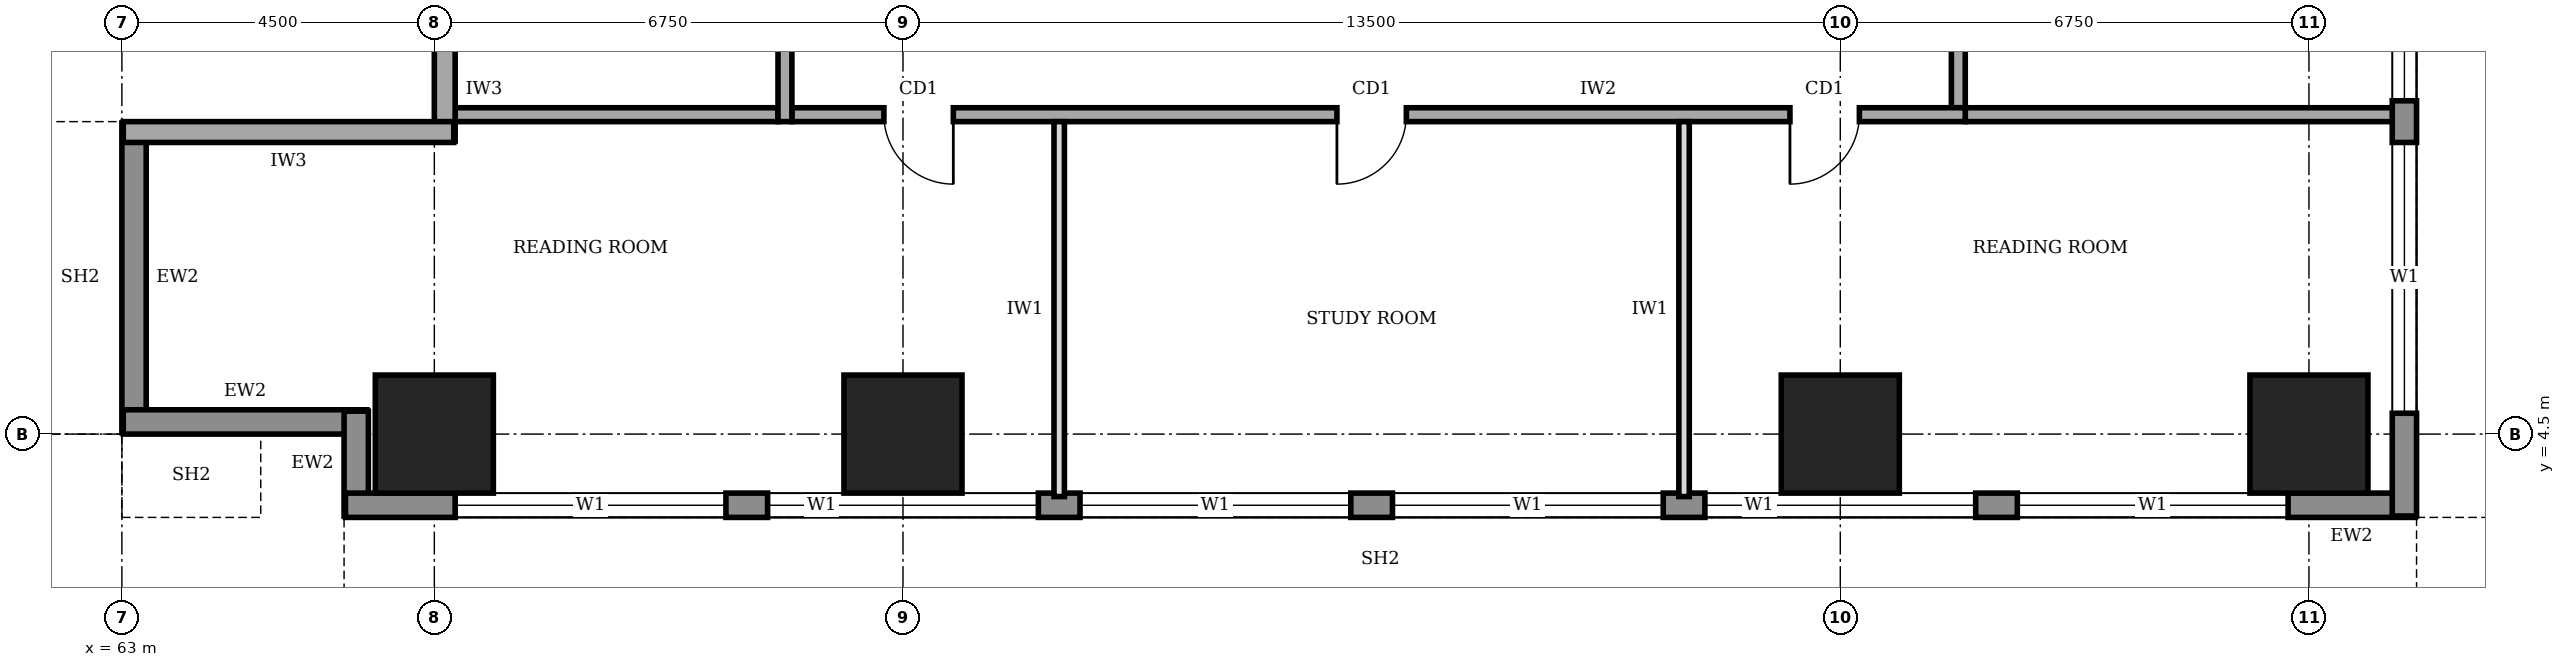
"""IFC4 building model, lengths in metres.
Left out: names, types, materials, properties, quantities, classifications, styles, units other than length and angle.
Written with IfcOpenShell. Run it as: python <this file> out.ifc"""

import sys

from ifc_helpers import new_model, si_unit, direction, frame, frame_2d, origin, origin_2d, place, context, subcontext, project, spatial, rectangle, extrude, element, fill, save


model = new_model("IFC4")
c1 = context("Model", 3, precision=1e-05, world=origin(), true_north=direction((0.0, 1.0)))
c2 = subcontext(c1, "Body", "Model", "MODEL_VIEW")
j1 = project(units=[si_unit("LENGTHUNIT", "METRE"), si_unit("PLANEANGLEUNIT", "RADIAN")], contexts=[c1])
p1 = place(None, origin())
s1 = spatial("IfcSite", under=j1, at=p1, CompositionType="ELEMENT")
p2 = place(p1, origin())
s2 = spatial("IfcBuilding", under=s1, at=p2, CompositionType="ELEMENT")
p3 = place(p2, frame((0.0, 0.0, 109.0)))
s3 = spatial("IfcBuildingStorey", under=s2, at=p3, CompositionType="ELEMENT", Elevation=109.0)
for number, where, z_axis, x_axis in (
    (1, (67.5, 4.5, 0.0), (0.0, 0.0, 1.0), (1.0, 0.0, 0.0)),
    (2, (74.25, 4.5, 0.0), (0.0, 0.0, 1.0), (1.0, 0.0, 0.0)),
    (3, (87.75, 4.5, 0.0), (0.0, 0.0, 1.0), (1.0, 0.0, 0.0)),
    (4, (94.5, 4.5, 0.0), (0.0, 0.0, 1.0), (1.0, 0.0, 0.0)),
):
    element("IfcColumn", number, at=place(p3, frame(where, z_axis=z_axis, x_axis=x_axis)), inside=s3, PredefinedType="COLUMN", context=c2, shape_type="SweptSolid", body=[
        extrude(rectangle(XDim=1.7, YDim=1.7, at=origin_2d()), origin(), (0.0, 0.0, 1.0), 4.0),
    ])
p4 = place(p3, frame((63.175, 8.98, 0.0), z_axis=(0.0, 0.0, 1.0), x_axis=(0.0, -1.0, 0.0)))
e5 = element("IfcWall", 5, at=p4, inside=s3, PredefinedType="STANDARD", context=c2, shape_type="SweptSolid", body=[
    extrude(rectangle(XDim=4.46, YDim=0.35, at=frame_2d((2.23, 0.0))), origin(), (0.0, 0.0, 1.0), 3.75),
])
p5 = place(p3, frame((63.02, 4.675, 0.0), z_axis=(0.0, 0.0, 1.0), x_axis=(1.0, 0.0, 0.0)))
e6 = element("IfcWall", 6, at=p5, inside=s3, PredefinedType="STANDARD", context=c2, shape_type="SweptSolid", body=[
    extrude(rectangle(XDim=3.51, YDim=0.35, at=frame_2d((1.755, 0.0))), origin(), (0.0, 0.0, 1.0), 2.85),
])
p6 = place(p3, frame((66.375, 4.83, 0.0), z_axis=(0.0, 0.0, 1.0), x_axis=(0.0, -1.0, 0.0)))
e7 = element("IfcWall", 7, at=p6, inside=s3, PredefinedType="STANDARD", context=c2, shape_type="SweptSolid", body=[
    extrude(rectangle(XDim=1.51, YDim=0.35, at=frame_2d((0.755, 0.0))), origin(), (0.0, 0.0, 1.0), 3.75),
])
p7 = place(p3, frame((66.22, 3.475, 0.0), z_axis=(0.0, 0.0, 1.0), x_axis=(1.0, 0.0, 0.0)))
e8 = element("IfcWall", 8, at=p7, inside=s3, PredefinedType="STANDARD", context=c2, shape_type="SweptSolid", body=[
    extrude(rectangle(XDim=29.81, YDim=0.35, at=frame_2d((14.905, 0.0))), origin(), (0.0, 0.0, 1.0), 3.75),
])
p8 = place(p7, frame((1.58, 0.0, 0.9)))
e9 = element("IfcOpeningElement", 9, at=p8, cuts=e8, PredefinedType="OPENING", context=c2, shape_type="SweptSolid", body=[
    extrude(rectangle(XDim=3.9, YDim=2.2, at=frame_2d((1.95, 1.1))), frame((0.0, 0.185, 0.0), z_axis=(0.0, -1.0, 0.0), x_axis=(1.0, 0.0, 0.0)), (0.0, 0.0, 1.0), 0.37),
])
p9 = place(p7, frame((6.08, 0.0, 0.9)))
e10 = element("IfcOpeningElement", 10, at=p9, cuts=e8, PredefinedType="OPENING", context=c2, shape_type="SweptSolid", body=[
    extrude(rectangle(XDim=3.9, YDim=2.2, at=frame_2d((1.95, 1.1))), frame((0.0, 0.185, 0.0), z_axis=(0.0, -1.0, 0.0), x_axis=(1.0, 0.0, 0.0)), (0.0, 0.0, 1.0), 0.37),
])
p10 = place(p7, frame((10.58, 0.0, 0.9)))
e11 = element("IfcOpeningElement", 11, at=p10, cuts=e8, PredefinedType="OPENING", context=c2, shape_type="SweptSolid", body=[
    extrude(rectangle(XDim=3.9, YDim=2.2, at=frame_2d((1.95, 1.1))), frame((0.0, 0.185, 0.0), z_axis=(0.0, -1.0, 0.0), x_axis=(1.0, 0.0, 0.0)), (0.0, 0.0, 1.0), 0.37),
])
p11 = place(p7, frame((15.08, 0.0, 0.9)))
e12 = element("IfcOpeningElement", 12, at=p11, cuts=e8, PredefinedType="OPENING", context=c2, shape_type="SweptSolid", body=[
    extrude(rectangle(XDim=3.9, YDim=2.2, at=frame_2d((1.95, 1.1))), frame((0.0, 0.185, 0.0), z_axis=(0.0, -1.0, 0.0), x_axis=(1.0, 0.0, 0.0)), (0.0, 0.0, 1.0), 0.37),
])
p12 = place(p7, frame((19.58, 0.0, 0.9)))
e13 = element("IfcOpeningElement", 13, at=p12, cuts=e8, PredefinedType="OPENING", context=c2, shape_type="SweptSolid", body=[
    extrude(rectangle(XDim=3.9, YDim=2.2, at=frame_2d((1.95, 1.1))), frame((0.0, 0.185, 0.0), z_axis=(0.0, -1.0, 0.0), x_axis=(1.0, 0.0, 0.0)), (0.0, 0.0, 1.0), 0.37),
])
p13 = place(p7, frame((24.08, 0.0, 0.9)))
e14 = element("IfcOpeningElement", 14, at=p13, cuts=e8, PredefinedType="OPENING", context=c2, shape_type="SweptSolid", body=[
    extrude(rectangle(XDim=3.9, YDim=2.2, at=frame_2d((1.95, 1.1))), frame((0.0, 0.185, 0.0), z_axis=(0.0, -1.0, 0.0), x_axis=(1.0, 0.0, 0.0)), (0.0, 0.0, 1.0), 0.37),
])
p14 = place(p3, frame((95.875, 3.32, 0.0), z_axis=(0.0, 0.0, 1.0), x_axis=(0.0, 1.0, 0.0)))
e15 = element("IfcWall", 15, at=p14, inside=s3, PredefinedType="STANDARD", context=c2, shape_type="SweptSolid", body=[
    extrude(rectangle(XDim=33.96, YDim=0.35, at=frame_2d((16.98, 0.0))), origin(), (0.0, 0.0, 1.0), 3.75),
])
p15 = place(p14, frame((1.48, 0.0, 0.9)))
e16 = element("IfcOpeningElement", 16, at=p15, cuts=e15, PredefinedType="OPENING", context=c2, shape_type="SweptSolid", body=[
    extrude(rectangle(XDim=3.9, YDim=2.2, at=frame_2d((1.95, 1.1))), frame((0.0, 0.185, 0.0), z_axis=(0.0, -1.0, 0.0), x_axis=(1.0, 0.0, 0.0)), (0.0, 0.0, 1.0), 0.37),
])
p16 = place(p14, frame((5.98, 0.0, 0.9)))
e17 = element("IfcOpeningElement", 17, at=p16, cuts=e15, PredefinedType="OPENING", context=c2, shape_type="SweptSolid", body=[
    extrude(rectangle(XDim=3.9, YDim=2.2, at=frame_2d((1.95, 1.1))), frame((0.0, 0.185, 0.0), z_axis=(0.0, -1.0, 0.0), x_axis=(1.0, 0.0, 0.0)), (0.0, 0.0, 1.0), 0.37),
])
p17 = place(p14, frame((10.48, 0.0, 0.9)))
e18 = element("IfcOpeningElement", 18, at=p17, cuts=e15, PredefinedType="OPENING", context=c2, shape_type="SweptSolid", body=[
    extrude(rectangle(XDim=3.9, YDim=2.2, at=frame_2d((1.95, 1.1))), frame((0.0, 0.185, 0.0), z_axis=(0.0, -1.0, 0.0), x_axis=(1.0, 0.0, 0.0)), (0.0, 0.0, 1.0), 0.37),
])
p18 = place(p14, frame((14.98, 0.0, 0.9)))
e19 = element("IfcOpeningElement", 19, at=p18, cuts=e15, PredefinedType="OPENING", context=c2, shape_type="SweptSolid", body=[
    extrude(rectangle(XDim=3.9, YDim=2.2, at=frame_2d((1.95, 1.1))), frame((0.0, 0.185, 0.0), z_axis=(0.0, -1.0, 0.0), x_axis=(1.0, 0.0, 0.0)), (0.0, 0.0, 1.0), 0.37),
])
p19 = place(p14, frame((19.48, 0.0, 0.9)))
e20 = element("IfcOpeningElement", 20, at=p19, cuts=e15, PredefinedType="OPENING", context=c2, shape_type="SweptSolid", body=[
    extrude(rectangle(XDim=3.9, YDim=2.2, at=frame_2d((1.95, 1.1))), frame((0.0, 0.185, 0.0), z_axis=(0.0, -1.0, 0.0), x_axis=(1.0, 0.0, 0.0)), (0.0, 0.0, 1.0), 0.37),
])
p20 = place(p14, frame((23.98, 0.0, 0.9)))
e21 = element("IfcOpeningElement", 21, at=p20, cuts=e15, PredefinedType="OPENING", context=c2, shape_type="SweptSolid", body=[
    extrude(rectangle(XDim=3.9, YDim=2.2, at=frame_2d((1.95, 1.1))), frame((0.0, 0.185, 0.0), z_axis=(0.0, -1.0, 0.0), x_axis=(1.0, 0.0, 0.0)), (0.0, 0.0, 1.0), 0.37),
])
p21 = place(p14, frame((28.48, 0.0, 0.9)))
e22 = element("IfcOpeningElement", 22, at=p21, cuts=e15, PredefinedType="OPENING", context=c2, shape_type="SweptSolid", body=[
    extrude(rectangle(XDim=3.9, YDim=2.2, at=frame_2d((1.95, 1.1))), frame((0.0, 0.185, 0.0), z_axis=(0.0, -1.0, 0.0), x_axis=(1.0, 0.0, 0.0)), (0.0, 0.0, 1.0), 0.37),
])
p22 = place(p3, frame((67.65, 10.2, 0.0), z_axis=(0.0, 0.0, 1.0), x_axis=(0.0, -1.0, 0.0)))
e23 = element("IfcWall", 23, at=p22, inside=s3, PredefinedType="SOLIDWALL", context=c2, shape_type="SweptSolid", body=[
    extrude(rectangle(XDim=1.48, YDim=0.3, at=frame_2d((0.74, 0.0))), origin(), (0.0, 0.0, 1.0), 2.65),
])
p23 = place(p3, frame((67.78, 8.85, 0.0), z_axis=(0.0, 0.0, 1.0), x_axis=(-1.0, 0.0, 0.0)))
e24 = element("IfcWall", 24, at=p23, inside=s3, PredefinedType="SOLIDWALL", context=c2, shape_type="SweptSolid", body=[
    extrude(rectangle(XDim=4.76, YDim=0.3, at=frame_2d((2.38, 0.0))), origin(), (0.0, 0.0, 1.0), 3.75),
])
p24 = place(p3, frame((72.65, 9.1, 0.0), z_axis=(0.0, 0.0, 1.0), x_axis=(1.0, 0.0, 0.0)))
e25 = element("IfcWall", 25, at=p24, inside=s3, PredefinedType="SOLIDWALL", context=c2, shape_type="SweptSolid", body=[
    extrude(rectangle(XDim=16.9, YDim=0.2, at=frame_2d((8.45, 0.0))), origin(), (0.0, 0.0, 1.0), 3.75),
])
p25 = place(p24, frame((1.325, 0.0, 0.0)))
e26 = element("IfcOpeningElement", 26, at=p25, cuts=e25, PredefinedType="OPENING", context=c2, shape_type="SweptSolid", body=[
    extrude(rectangle(XDim=1.0, YDim=2.1, at=frame_2d((0.5, 1.05))), frame((0.0, 0.11, 0.0), z_axis=(0.0, -1.0, 0.0), x_axis=(1.0, 0.0, 0.0)), (0.0, 0.0, 1.0), 0.22),
])
p26 = place(p24, frame((7.85, 0.0, 0.0)))
e27 = element("IfcOpeningElement", 27, at=p26, cuts=e25, PredefinedType="OPENING", context=c2, shape_type="SweptSolid", body=[
    extrude(rectangle(XDim=1.0, YDim=2.1, at=frame_2d((0.5, 1.05))), frame((0.0, 0.11, 0.0), z_axis=(0.0, -1.0, 0.0), x_axis=(1.0, 0.0, 0.0)), (0.0, 0.0, 1.0), 0.22),
])
p27 = place(p24, frame((14.375, 0.0, 0.0)))
e28 = element("IfcOpeningElement", 28, at=p27, cuts=e25, PredefinedType="OPENING", context=c2, shape_type="SweptSolid", body=[
    extrude(rectangle(XDim=1.0, YDim=2.1, at=frame_2d((0.5, 1.05))), frame((0.0, 0.11, 0.0), z_axis=(0.0, -1.0, 0.0), x_axis=(1.0, 0.0, 0.0)), (0.0, 0.0, 1.0), 0.22),
])
p28 = place(p3, frame((89.45, 9.2, 0.0), z_axis=(0.0, 0.0, 1.0), x_axis=(0.0, 1.0, 0.0)))
e29 = element("IfcWall", 29, at=p28, inside=s3, PredefinedType="SOLIDWALL", context=c2, shape_type="SweptSolid", body=[
    extrude(rectangle(XDim=23.8, YDim=0.2, at=frame_2d((11.9, 0.0))), origin(), (0.0, 0.0, 1.0), 3.75),
])
p29 = place(p28, frame((1.625, 0.0, 0.0)))
e30 = element("IfcOpeningElement", 30, at=p29, cuts=e29, PredefinedType="OPENING", context=c2, shape_type="SweptSolid", body=[
    extrude(rectangle(XDim=1.0, YDim=2.1, at=frame_2d((0.5, 1.05))), frame((0.0, 0.11, 0.0), z_axis=(0.0, -1.0, 0.0), x_axis=(1.0, 0.0, 0.0)), (0.0, 0.0, 1.0), 0.22),
])
p30 = place(p28, frame((5.625, 0.0, 0.0)))
e31 = element("IfcOpeningElement", 31, at=p30, cuts=e29, PredefinedType="OPENING", context=c2, shape_type="SweptSolid", body=[
    extrude(rectangle(XDim=0.9, YDim=2.1, at=frame_2d((0.45, 1.05))), frame((0.0, 0.11, 0.0), z_axis=(0.0, -1.0, 0.0), x_axis=(1.0, 0.0, 0.0)), (0.0, 0.0, 1.0), 0.22),
])
p31 = place(p28, frame((10.35, 0.0, 0.0)))
e32 = element("IfcOpeningElement", 32, at=p31, cuts=e29, PredefinedType="OPENING", context=c2, shape_type="SweptSolid", body=[
    extrude(rectangle(XDim=0.9, YDim=2.1, at=frame_2d((0.45, 1.05))), frame((0.0, 0.11, 0.0), z_axis=(0.0, -1.0, 0.0), x_axis=(1.0, 0.0, 0.0)), (0.0, 0.0, 1.0), 0.22),
])
p32 = place(p28, frame((13.325, 0.0, 0.0)))
e33 = element("IfcOpeningElement", 33, at=p32, cuts=e29, PredefinedType="OPENING", context=c2, shape_type="SweptSolid", body=[
    extrude(rectangle(XDim=0.9, YDim=2.1, at=frame_2d((0.45, 1.05))), frame((0.0, 0.11, 0.0), z_axis=(0.0, -1.0, 0.0), x_axis=(1.0, 0.0, 0.0)), (0.0, 0.0, 1.0), 0.22),
])
p33 = place(p28, frame((16.15, 0.0, 0.0)))
e34 = element("IfcOpeningElement", 34, at=p33, cuts=e29, PredefinedType="OPENING", context=c2, shape_type="SweptSolid", body=[
    extrude(rectangle(XDim=1.0, YDim=2.1, at=frame_2d((0.5, 1.05))), frame((0.0, 0.11, 0.0), z_axis=(0.0, -1.0, 0.0), x_axis=(1.0, 0.0, 0.0)), (0.0, 0.0, 1.0), 0.22),
])
p34 = place(p28, frame((8.2, 0.0, 0.0)))
e35 = element("IfcOpeningElement", 35, at=p34, cuts=e29, PredefinedType="OPENING", context=c2, shape_type="SweptSolid", body=[
    extrude(rectangle(XDim=1.0, YDim=2.1, at=frame_2d((0.5, 1.05))), frame((0.0, 0.11, 0.0), z_axis=(0.0, -1.0, 0.0), x_axis=(1.0, 0.0, 0.0)), (0.0, 0.0, 1.0), 0.22),
])
p35 = place(p28, frame((20.225, 0.0, 0.0)))
e36 = element("IfcOpeningElement", 36, at=p35, cuts=e29, PredefinedType="OPENING", context=c2, shape_type="SweptSolid", body=[
    extrude(rectangle(XDim=1.0, YDim=2.1, at=frame_2d((0.5, 1.05))), frame((0.0, 0.11, 0.0), z_axis=(0.0, -1.0, 0.0), x_axis=(1.0, 0.0, 0.0)), (0.0, 0.0, 1.0), 0.22),
])
p36 = place(p3, frame((72.55, 32.8, 0.0), z_axis=(0.0, 0.0, 1.0), x_axis=(0.0, -1.0, 0.0)))
e37 = element("IfcWall", 37, at=p36, inside=s3, PredefinedType="SOLIDWALL", context=c2, shape_type="SweptSolid", body=[
    extrude(rectangle(XDim=23.8, YDim=0.2, at=frame_2d((11.9, 0.0))), origin(), (0.0, 0.0, 1.0), 3.75),
])
p37 = place(p36, frame((10.9, 0.0, 0.0)))
e38 = element("IfcOpeningElement", 38, at=p37, cuts=e37, PredefinedType="OPENING", context=c2, shape_type="SweptSolid", body=[
    extrude(rectangle(XDim=1.8, YDim=2.1, at=frame_2d((0.9, 1.05))), frame((0.0, 0.11, 0.0), z_axis=(0.0, -1.0, 0.0), x_axis=(1.0, 0.0, 0.0)), (0.0, 0.0, 1.0), 0.22),
])
p38 = place(p3, frame((67.8, 9.1, 0.0), z_axis=(0.0, 0.0, 1.0), x_axis=(1.0, 0.0, 0.0)))
e39 = element("IfcWall", 39, at=p38, inside=s3, PredefinedType="SOLIDWALL", context=c2, shape_type="SweptSolid", body=[
    extrude(rectangle(XDim=4.65, YDim=0.2, at=frame_2d((2.325, 0.0))), origin(), (0.0, 0.0, 1.0), 3.75),
])
p39 = place(p3, frame((89.55, 9.1, 0.0), z_axis=(0.0, 0.0, 1.0), x_axis=(1.0, 0.0, 0.0)))
e40 = element("IfcWall", 40, at=p39, inside=s3, PredefinedType="SOLIDWALL", context=c2, shape_type="SweptSolid", body=[
    extrude(rectangle(XDim=6.2, YDim=0.2, at=frame_2d((3.1, 0.0))), origin(), (0.0, 0.0, 1.0), 3.75),
])
for number, where, z_axis, x_axis in (
    (41, (76.5, 3.6, 0.0), (0.0, 0.0, 1.0), (0.0, 1.0, 0.0)),
    (42, (85.5, 3.6, 0.0), (0.0, 0.0, 1.0), (0.0, 1.0, 0.0)),
):
    element("IfcWall", number, at=place(p3, frame(where, z_axis=z_axis, x_axis=x_axis)), inside=s3, PredefinedType="PARTITIONING", context=c2, shape_type="SweptSolid", body=[
        extrude(rectangle(XDim=5.4, YDim=0.15, at=frame_2d((2.7, 0.0))), origin(), (0.0, 0.0, 1.0), 3.75),
    ])
p40 = place(p8, origin())
e43 = element("IfcWindow", 43, at=p40, inside=s3, PartitioningType="SINGLE_PANEL", PredefinedType="WINDOW", context=c2, shape_type="SweptSolid", body=[
    extrude(rectangle(XDim=3.9, YDim=2.2, at=frame_2d((1.95, 1.1))), frame((0.0, 0.03, 0.0), z_axis=(0.0, -1.0, 0.0), x_axis=(1.0, 0.0, 0.0)), (0.0, 0.0, 1.0), 0.06),
])
fill(e9, e43)
p41 = place(p9, origin())
e44 = element("IfcWindow", 44, at=p41, inside=s3, PartitioningType="SINGLE_PANEL", PredefinedType="WINDOW", context=c2, shape_type="SweptSolid", body=[
    extrude(rectangle(XDim=3.9, YDim=2.2, at=frame_2d((1.95, 1.1))), frame((0.0, 0.03, 0.0), z_axis=(0.0, -1.0, 0.0), x_axis=(1.0, 0.0, 0.0)), (0.0, 0.0, 1.0), 0.06),
])
fill(e10, e44)
p42 = place(p10, origin())
e45 = element("IfcWindow", 45, at=p42, inside=s3, PartitioningType="SINGLE_PANEL", PredefinedType="WINDOW", context=c2, shape_type="SweptSolid", body=[
    extrude(rectangle(XDim=3.9, YDim=2.2, at=frame_2d((1.95, 1.1))), frame((0.0, 0.03, 0.0), z_axis=(0.0, -1.0, 0.0), x_axis=(1.0, 0.0, 0.0)), (0.0, 0.0, 1.0), 0.06),
])
fill(e11, e45)
p43 = place(p11, origin())
e46 = element("IfcWindow", 46, at=p43, inside=s3, PartitioningType="SINGLE_PANEL", PredefinedType="WINDOW", context=c2, shape_type="SweptSolid", body=[
    extrude(rectangle(XDim=3.9, YDim=2.2, at=frame_2d((1.95, 1.1))), frame((0.0, 0.03, 0.0), z_axis=(0.0, -1.0, 0.0), x_axis=(1.0, 0.0, 0.0)), (0.0, 0.0, 1.0), 0.06),
])
fill(e12, e46)
p44 = place(p12, origin())
e47 = element("IfcWindow", 47, at=p44, inside=s3, PartitioningType="SINGLE_PANEL", PredefinedType="WINDOW", context=c2, shape_type="SweptSolid", body=[
    extrude(rectangle(XDim=3.9, YDim=2.2, at=frame_2d((1.95, 1.1))), frame((0.0, 0.03, 0.0), z_axis=(0.0, -1.0, 0.0), x_axis=(1.0, 0.0, 0.0)), (0.0, 0.0, 1.0), 0.06),
])
fill(e13, e47)
p45 = place(p13, origin())
e48 = element("IfcWindow", 48, at=p45, inside=s3, PartitioningType="SINGLE_PANEL", PredefinedType="WINDOW", context=c2, shape_type="SweptSolid", body=[
    extrude(rectangle(XDim=3.9, YDim=2.2, at=frame_2d((1.95, 1.1))), frame((0.0, 0.03, 0.0), z_axis=(0.0, -1.0, 0.0), x_axis=(1.0, 0.0, 0.0)), (0.0, 0.0, 1.0), 0.06),
])
fill(e14, e48)
p46 = place(p15, origin())
e49 = element("IfcWindow", 49, at=p46, inside=s3, PartitioningType="SINGLE_PANEL", PredefinedType="WINDOW", context=c2, shape_type="SweptSolid", body=[
    extrude(rectangle(XDim=3.9, YDim=2.2, at=frame_2d((1.95, 1.1))), frame((0.0, 0.03, 0.0), z_axis=(0.0, -1.0, 0.0), x_axis=(1.0, 0.0, 0.0)), (0.0, 0.0, 1.0), 0.06),
])
fill(e16, e49)
p47 = place(p16, origin())
e50 = element("IfcWindow", 50, at=p47, inside=s3, PartitioningType="SINGLE_PANEL", PredefinedType="WINDOW", context=c2, shape_type="SweptSolid", body=[
    extrude(rectangle(XDim=3.9, YDim=2.2, at=frame_2d((1.95, 1.1))), frame((0.0, 0.03, 0.0), z_axis=(0.0, -1.0, 0.0), x_axis=(1.0, 0.0, 0.0)), (0.0, 0.0, 1.0), 0.06),
])
fill(e17, e50)
p48 = place(p25, frame((1.0, 0.0, 0.0), z_axis=(0.0, 0.0, 1.0), x_axis=(-1.0, 0.0, 0.0)))
e51 = element("IfcDoor", 51, at=p48, inside=s3, OperationType="SINGLE_SWING_LEFT", PredefinedType="DOOR", context=c2, shape_type="SweptSolid", body=[
    extrude(rectangle(XDim=1.0, YDim=2.1, at=frame_2d((0.5, 1.05))), frame((0.0, 0.025, 0.0), z_axis=(0.0, -1.0, 0.0), x_axis=(1.0, 0.0, 0.0)), (0.0, 0.0, 1.0), 0.05),
])
fill(e26, e51)
p49 = place(p26, frame((1.0, 0.0, 0.0), z_axis=(0.0, 0.0, 1.0), x_axis=(-1.0, 0.0, 0.0)))
e52 = element("IfcDoor", 52, at=p49, inside=s3, OperationType="SINGLE_SWING_RIGHT", PredefinedType="DOOR", context=c2, shape_type="SweptSolid", body=[
    extrude(rectangle(XDim=1.0, YDim=2.1, at=frame_2d((0.5, 1.05))), frame((0.0, 0.025, 0.0), z_axis=(0.0, -1.0, 0.0), x_axis=(1.0, 0.0, 0.0)), (0.0, 0.0, 1.0), 0.05),
])
fill(e27, e52)
p50 = place(p27, frame((1.0, 0.0, 0.0), z_axis=(0.0, 0.0, 1.0), x_axis=(-1.0, 0.0, 0.0)))
e53 = element("IfcDoor", 53, at=p50, inside=s3, OperationType="SINGLE_SWING_RIGHT", PredefinedType="DOOR", context=c2, shape_type="SweptSolid", body=[
    extrude(rectangle(XDim=1.0, YDim=2.1, at=frame_2d((0.5, 1.05))), frame((0.0, 0.025, 0.0), z_axis=(0.0, -1.0, 0.0), x_axis=(1.0, 0.0, 0.0)), (0.0, 0.0, 1.0), 0.05),
])
fill(e28, e53)
save(model, sys.argv[1])
